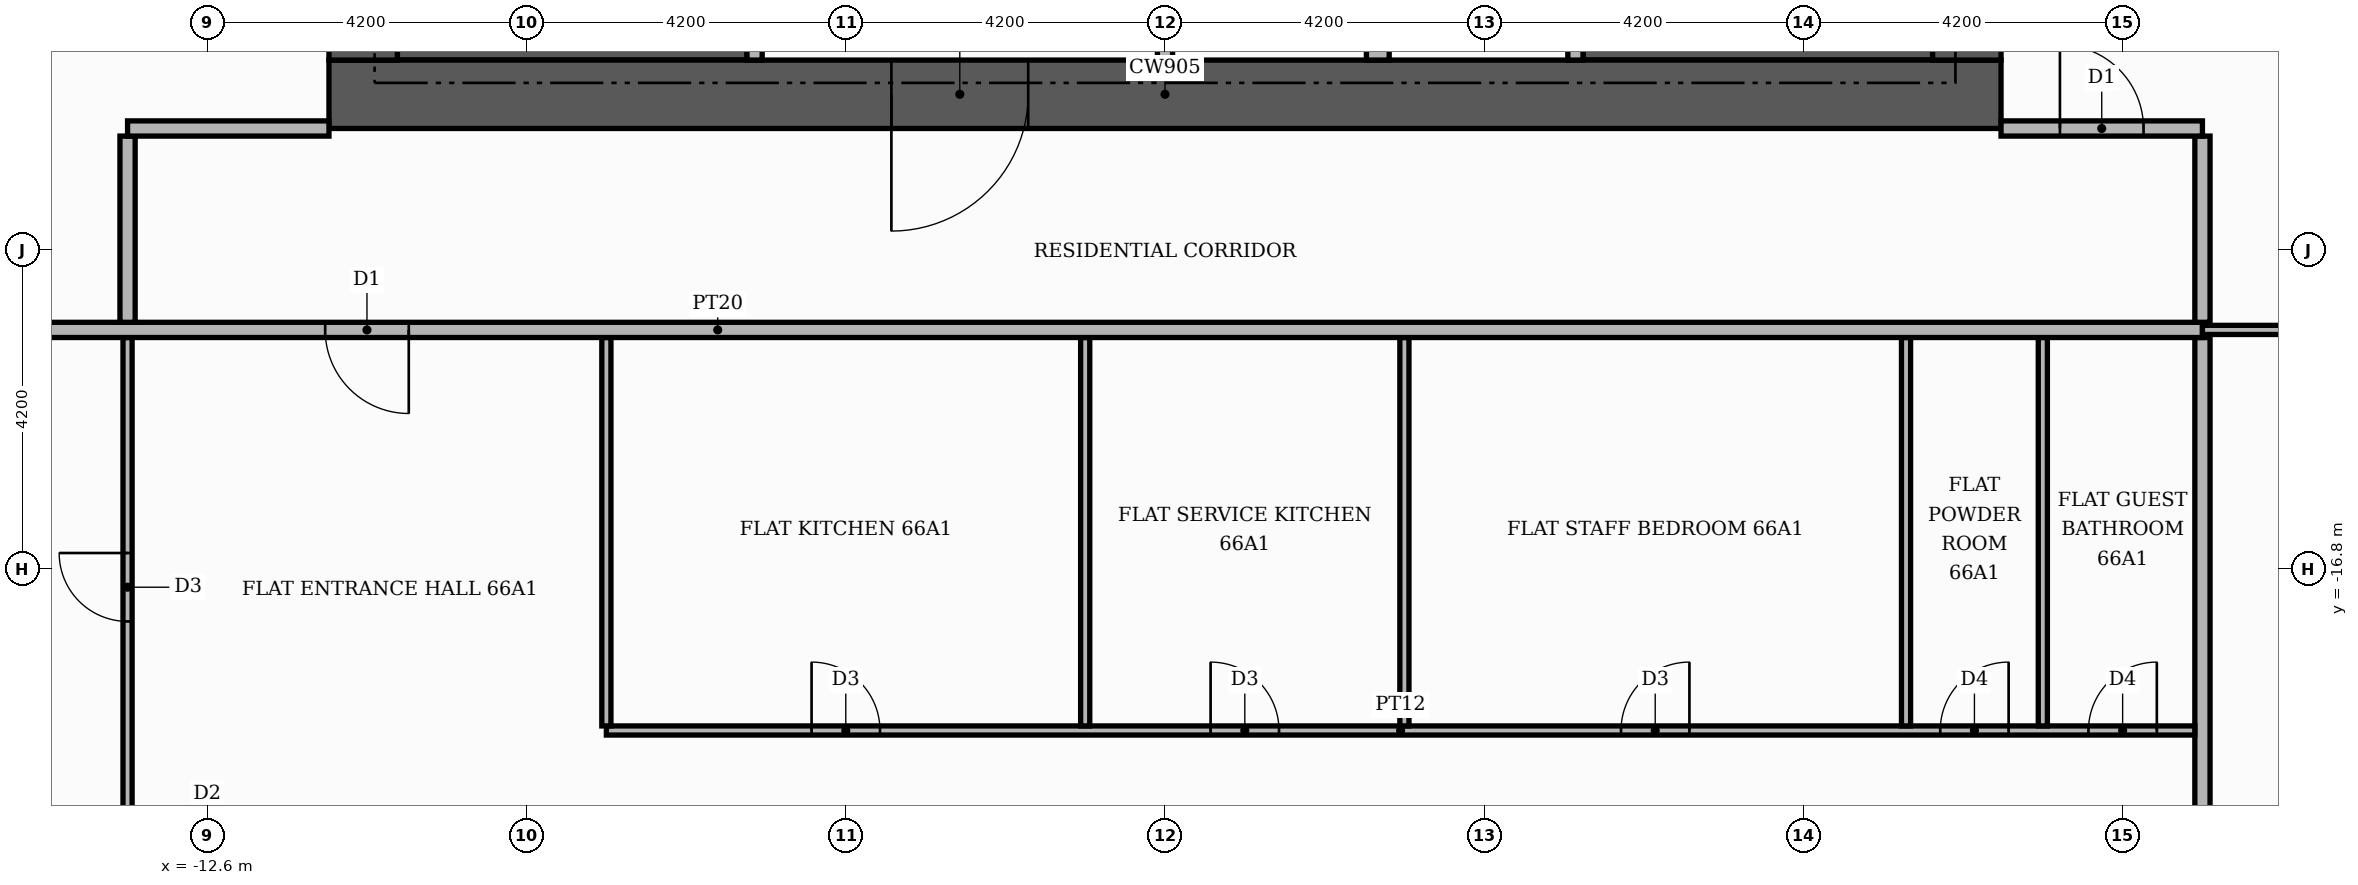
"""IFC4 building model, lengths in metres.
Left out: names, types, materials, properties, quantities, classifications, styles, units other than length and angle.
Written with IfcOpenShell. Run it as: python <this file> out.ifc"""

import sys

from ifc_helpers import new_model, si_unit, direction, frame, frame_2d, origin, place, context, subcontext, project, spatial, rectangle, extrude, element, fill, save


model = new_model("IFC4")
c1 = context("Model", 3, precision=1e-05, world=origin(), true_north=direction((0.0, 1.0)))
c2 = subcontext(c1, "Body", "Model", "MODEL_VIEW")
j1 = project(units=[si_unit("LENGTHUNIT", "METRE"), si_unit("PLANEANGLEUNIT", "RADIAN")], contexts=[c1])
p1 = place(None, origin())
s1 = spatial("IfcSite", under=j1, at=p1, CompositionType="ELEMENT")
p2 = place(p1, origin())
s2 = spatial("IfcBuilding", under=s1, at=p2, CompositionType="ELEMENT")
p3 = place(p2, frame((0.0, 0.0, 275.7)))
s3 = spatial("IfcBuildingStorey", under=s2, at=p3, CompositionType="ELEMENT", Elevation=275.7)
for number, where, z_axis, x_axis in (
    (1, (-10.1, -9.15, 0.0), (0.0, 0.0, 1.0), (1.0, 0.0, 0.0)),
    (2, (5.5, -9.15, 0.0), (0.0, 0.0, 1.0), (1.0, 0.0, 0.0)),
):
    element("IfcWall", number, at=place(p3, frame(where, z_axis=z_axis, x_axis=x_axis)), inside=s3, PredefinedType="SHEAR", context=c2, shape_type="SweptSolid", body=[
        extrude(rectangle(XDim=4.6, YDim=1.9, at=frame_2d((2.3, 0.0))), origin(), (0.0, 0.0, 1.0), 3.48),
    ])
p4 = place(p3, frame((-11.0, -10.55, 0.0), z_axis=(0.0, 0.0, 1.0), x_axis=(1.0, 0.0, 0.0)))
e3 = element("IfcWall", 3, at=p4, inside=s3, PredefinedType="SHEAR", context=c2, shape_type="SweptSolid", body=[
    extrude(rectangle(XDim=22.0, YDim=0.9, at=frame_2d((11.0, 0.0))), origin(), (0.0, 0.0, 1.0), 3.48),
])
p5 = place(p4, frame((7.4, 0.0, 0.0)))
e4 = element("IfcOpeningElement", 4, at=p5, cuts=e3, PredefinedType="OPENING", context=c2, shape_type="SweptSolid", body=[
    extrude(rectangle(XDim=1.8, YDim=2.2, at=frame_2d((0.9, 1.1))), frame((0.0, 0.46, 0.0), z_axis=(0.0, -1.0, 0.0), x_axis=(1.0, 0.0, 0.0)), (0.0, 0.0, 1.0), 0.92),
])
for number, where, z_axis, x_axis in (
    (5, (-10.55, -10.1, 0.0), (0.0, 0.0, 1.0), (0.0, 1.0, 0.0)),
    (6, (10.55, -10.1, 0.0), (0.0, 0.0, 1.0), (0.0, 1.0, 0.0)),
):
    element("IfcWall", number, at=place(p3, frame(where, z_axis=z_axis, x_axis=x_axis)), inside=s3, PredefinedType="SHEAR", context=c2, shape_type="SweptSolid", body=[
        extrude(rectangle(XDim=20.2, YDim=0.9, at=frame_2d((10.1, 0.0))), origin(), (0.0, 0.0, 1.0), 3.48),
    ])
p6 = place(p3, frame((-5.4, -10.1, 0.0), z_axis=(0.0, 0.0, 1.0), x_axis=(0.0, 1.0, 0.0)))
e7 = element("IfcWall", 7, at=p6, inside=s3, PredefinedType="PARTITIONING", context=c2, shape_type="SweptSolid", body=[
    extrude(rectangle(XDim=4.6, YDim=0.2, at=frame_2d((2.3, 0.0))), origin(), (0.0, 0.0, 1.0), 3.48),
])
p7 = place(p6, frame((2.9, 0.0, 0.0)))
e8 = element("IfcOpeningElement", 8, at=p7, cuts=e7, PredefinedType="OPENING", context=c2, shape_type="SweptSolid", body=[
    extrude(rectangle(XDim=1.0, YDim=2.1, at=frame_2d((0.5, 1.05))), frame((0.0, 0.11, 0.0), z_axis=(0.0, -1.0, 0.0), x_axis=(1.0, 0.0, 0.0)), (0.0, 0.0, 1.0), 0.22),
])
p8 = place(p3, frame((0.0, -10.1, 0.0), z_axis=(0.0, 0.0, 1.0), x_axis=(0.0, 1.0, 0.0)))
e9 = element("IfcWall", 9, at=p8, inside=s3, PredefinedType="PARTITIONING", context=c2, shape_type="SweptSolid", body=[
    extrude(rectangle(XDim=2.2, YDim=0.2, at=frame_2d((1.1, 0.0))), origin(), (0.0, 0.0, 1.0), 3.48),
])
p9 = place(p3, frame((2.8, -10.1, 0.0), z_axis=(0.0, 0.0, 1.0), x_axis=(0.0, 1.0, 0.0)))
e10 = element("IfcWall", 10, at=p9, inside=s3, PredefinedType="PARTITIONING", context=c2, shape_type="SweptSolid", body=[
    extrude(rectangle(XDim=2.2, YDim=0.3, at=frame_2d((1.1, 0.0))), origin(), (0.0, 0.0, 1.0), 3.48),
])
p10 = place(p3, frame((5.4, -10.1, 0.0), z_axis=(0.0, 0.0, 1.0), x_axis=(0.0, 1.0, 0.0)))
e11 = element("IfcWall", 11, at=p10, inside=s3, PredefinedType="PARTITIONING", context=c2, shape_type="SweptSolid", body=[
    extrude(rectangle(XDim=4.6, YDim=0.2, at=frame_2d((2.3, 0.0))), origin(), (0.0, 0.0, 1.0), 3.48),
])
p11 = place(p10, frame((2.9, 0.0, 0.0)))
e12 = element("IfcOpeningElement", 12, at=p11, cuts=e11, PredefinedType="OPENING", context=c2, shape_type="SweptSolid", body=[
    extrude(rectangle(XDim=1.0, YDim=2.1, at=frame_2d((0.5, 1.05))), frame((0.0, 0.11, 0.0), z_axis=(0.0, -1.0, 0.0), x_axis=(1.0, 0.0, 0.0)), (0.0, 0.0, 1.0), 0.22),
])
p12 = place(p3, frame((13.65, -25.42, 0.0), z_axis=(0.0, 0.0, 1.0), x_axis=(0.0, 1.0, 0.0)))
e13 = element("IfcWall", 13, at=p12, inside=s3, PredefinedType="PARTITIONING", context=c2, shape_type="SweptSolid", body=[
    extrude(rectangle(XDim=11.67, YDim=0.2, at=frame_2d((5.835, 0.0))), origin(), (0.0, 0.0, 1.0), 3.48),
])
p13 = place(p3, frame((-13.65, -20.36, 0.0), z_axis=(0.0, 0.0, 1.0), x_axis=(0.0, 1.0, 0.0)))
e14 = element("IfcWall", 14, at=p13, inside=s3, PredefinedType="PARTITIONING", context=c2, shape_type="SweptSolid", body=[
    extrude(rectangle(XDim=6.61, YDim=0.12, at=frame_2d((3.305, 0.0))), origin(), (0.0, 0.0, 1.0), 3.48),
])
p14 = place(p13, frame((2.875, 0.0, 0.0)))
e15 = element("IfcOpeningElement", 15, at=p14, cuts=e14, PredefinedType="OPENING", context=c2, shape_type="SweptSolid", body=[
    extrude(rectangle(XDim=0.9, YDim=2.1, at=frame_2d((0.45, 1.05))), frame((0.0, 0.07, 0.0), z_axis=(0.0, -1.0, 0.0), x_axis=(1.0, 0.0, 0.0)), (0.0, 0.0, 1.0), 0.14),
])
p15 = place(p3, frame((-7.35, -18.92, 0.0), z_axis=(0.0, 0.0, 1.0), x_axis=(1.0, 0.0, 0.0)))
e16 = element("IfcWall", 16, at=p15, inside=s3, PredefinedType="PARTITIONING", context=c2, shape_type="SweptSolid", body=[
    extrude(rectangle(XDim=20.9, YDim=0.12, at=frame_2d((10.45, 0.0))), origin(), (0.0, 0.0, 1.0), 3.48),
])
p16 = place(p15, frame((2.7, 0.0, 0.0)))
e17 = element("IfcOpeningElement", 17, at=p16, cuts=e16, PredefinedType="OPENING", context=c2, shape_type="SweptSolid", body=[
    extrude(rectangle(XDim=0.9, YDim=2.1, at=frame_2d((0.45, 1.05))), frame((0.0, 0.07, 0.0), z_axis=(0.0, -1.0, 0.0), x_axis=(1.0, 0.0, 0.0)), (0.0, 0.0, 1.0), 0.14),
])
p17 = place(p15, frame((7.95, 0.0, 0.0)))
e18 = element("IfcOpeningElement", 18, at=p17, cuts=e16, PredefinedType="OPENING", context=c2, shape_type="SweptSolid", body=[
    extrude(rectangle(XDim=0.9, YDim=2.1, at=frame_2d((0.45, 1.05))), frame((0.0, 0.07, 0.0), z_axis=(0.0, -1.0, 0.0), x_axis=(1.0, 0.0, 0.0)), (0.0, 0.0, 1.0), 0.14),
])
p18 = place(p15, frame((13.35, 0.0, 0.0)))
e19 = element("IfcOpeningElement", 19, at=p18, cuts=e16, PredefinedType="OPENING", context=c2, shape_type="SweptSolid", body=[
    extrude(rectangle(XDim=0.9, YDim=2.1, at=frame_2d((0.45, 1.05))), frame((0.0, 0.07, 0.0), z_axis=(0.0, -1.0, 0.0), x_axis=(1.0, 0.0, 0.0)), (0.0, 0.0, 1.0), 0.14),
])
p19 = place(p15, frame((17.55, 0.0, 0.0)))
e20 = element("IfcOpeningElement", 20, at=p19, cuts=e16, PredefinedType="OPENING", context=c2, shape_type="SweptSolid", body=[
    extrude(rectangle(XDim=0.9, YDim=2.1, at=frame_2d((0.45, 1.05))), frame((0.0, 0.07, 0.0), z_axis=(0.0, -1.0, 0.0), x_axis=(1.0, 0.0, 0.0)), (0.0, 0.0, 1.0), 0.14),
])
p20 = place(p15, frame((19.5, 0.0, 0.0)))
e21 = element("IfcOpeningElement", 21, at=p20, cuts=e16, PredefinedType="OPENING", context=c2, shape_type="SweptSolid", body=[
    extrude(rectangle(XDim=0.9, YDim=2.1, at=frame_2d((0.45, 1.05))), frame((0.0, 0.07, 0.0), z_axis=(0.0, -1.0, 0.0), x_axis=(1.0, 0.0, 0.0)), (0.0, 0.0, 1.0), 0.14),
])
for number, where, z_axis, x_axis in (
    (22, (-7.35, -18.86, 0.0), (0.0, 0.0, 1.0), (0.0, 1.0, 0.0)),
    (23, (-1.05, -18.86, 0.0), (0.0, 0.0, 1.0), (0.0, 1.0, 0.0)),
    (24, (3.15, -18.86, 0.0), (0.0, 0.0, 1.0), (0.0, 1.0, 0.0)),
    (25, (9.75, -18.86, 0.0), (0.0, 0.0, 1.0), (0.0, 1.0, 0.0)),
    (26, (11.55, -18.86, 0.0), (0.0, 0.0, 1.0), (0.0, 1.0, 0.0)),
):
    element("IfcWall", number, at=place(p3, frame(where, z_axis=z_axis, x_axis=x_axis)), inside=s3, PredefinedType="PARTITIONING", context=c2, shape_type="SweptSolid", body=[
        extrude(rectangle(XDim=5.11, YDim=0.12, at=frame_2d((2.555, 0.0))), origin(), (0.0, 0.0, 1.0), 3.48),
    ])
p21 = place(p3, frame((-25.42, -13.65, 0.0), z_axis=(0.0, 0.0, 1.0), x_axis=(1.0, 0.0, 0.0)))
e27 = element("IfcWall", 27, at=p21, inside=s3, PredefinedType="PARTITIONING", context=c2, shape_type="SweptSolid", body=[
    extrude(rectangle(XDim=39.07, YDim=0.2, at=frame_2d((19.535, 0.0))), origin(), (0.0, 0.0, 1.0), 3.48),
])
p22 = place(p21, frame((14.37, 0.0, 0.0)))
e28 = element("IfcOpeningElement", 28, at=p22, cuts=e27, PredefinedType="OPENING", context=c2, shape_type="SweptSolid", body=[
    extrude(rectangle(XDim=1.1, YDim=2.4, at=frame_2d((0.55, 1.2))), frame((0.0, 0.11, 0.0), z_axis=(0.0, -1.0, 0.0), x_axis=(1.0, 0.0, 0.0)), (0.0, 0.0, 1.0), 0.22),
])
p23 = place(p3, frame((13.65, -13.65, 0.0), z_axis=(0.0, 0.0, 1.0), x_axis=(1.0, 0.0, 0.0)))
e29 = element("IfcWall", 29, at=p23, inside=s3, PredefinedType="PARTITIONING", context=c2, shape_type="SweptSolid", body=[
    extrude(rectangle(XDim=6.17, YDim=0.12, at=frame_2d((3.085, 0.0))), origin(), (0.0, 0.0, 1.0), 3.48),
])
p24 = place(p23, frame((2.585, 0.0, 0.0)))
e30 = element("IfcOpeningElement", 30, at=p24, cuts=e29, PredefinedType="OPENING", context=c2, shape_type="SweptSolid", body=[
    extrude(rectangle(XDim=1.0, YDim=2.1, at=frame_2d((0.5, 1.05))), frame((0.0, 0.07, 0.0), z_axis=(0.0, -1.0, 0.0), x_axis=(1.0, 0.0, 0.0)), (0.0, 0.0, 1.0), 0.14),
])
for number, where, z_axis, x_axis in (
    (31, (-13.65, -13.55, 0.0), (0.0, 0.0, 1.0), (0.0, 1.0, 0.0)),
    (32, (13.65, -13.55, 0.0), (0.0, 0.0, 1.0), (0.0, 1.0, 0.0)),
):
    element("IfcWall", number, at=place(p3, frame(where, z_axis=z_axis, x_axis=x_axis)), inside=s3, PredefinedType="PARTITIONING", context=c2, shape_type="SweptSolid", body=[
        extrude(rectangle(XDim=2.45, YDim=0.2, at=frame_2d((1.225, 0.0))), origin(), (0.0, 0.0, 1.0), 3.48),
    ])
p25 = place(p3, frame((-13.65, -11.0, 0.0), z_axis=(0.0, 0.0, 1.0), x_axis=(1.0, 0.0, 0.0)))
e33 = element("IfcWall", 33, at=p25, inside=s3, PredefinedType="PARTITIONING", context=c2, shape_type="SweptSolid", body=[
    extrude(rectangle(XDim=2.65, YDim=0.2, at=frame_2d((1.325, 0.0))), origin(), (0.0, 0.0, 1.0), 3.48),
])
p26 = place(p3, frame((11.0, -11.0, 0.0), z_axis=(0.0, 0.0, 1.0), x_axis=(1.0, 0.0, 0.0)))
e34 = element("IfcWall", 34, at=p26, inside=s3, PredefinedType="PARTITIONING", context=c2, shape_type="SweptSolid", body=[
    extrude(rectangle(XDim=2.65, YDim=0.2, at=frame_2d((1.325, 0.0))), origin(), (0.0, 0.0, 1.0), 3.48),
])
p27 = place(p26, frame((0.775, 0.0, 0.0)))
e35 = element("IfcOpeningElement", 35, at=p27, cuts=e34, PredefinedType="OPENING", context=c2, shape_type="SweptSolid", body=[
    extrude(rectangle(XDim=1.1, YDim=2.4, at=frame_2d((0.55, 1.2))), frame((0.0, 0.11, 0.0), z_axis=(0.0, -1.0, 0.0), x_axis=(1.0, 0.0, 0.0)), (0.0, 0.0, 1.0), 0.22),
])
p28 = place(p5, frame((1.8, 0.0, 0.0), z_axis=(0.0, 0.0, 1.0), x_axis=(-1.0, 0.0, 0.0)))
e36 = element("IfcDoor", 36, at=p28, inside=s3, OperationType="DOUBLE_DOOR_SINGLE_SWING", PredefinedType="DOOR", context=c2, shape_type="SweptSolid", body=[
    extrude(rectangle(XDim=1.8, YDim=2.2, at=frame_2d((0.9, 1.1))), frame((0.0, 0.025, 0.0), z_axis=(0.0, -1.0, 0.0), x_axis=(1.0, 0.0, 0.0)), (0.0, 0.0, 1.0), 0.05),
])
fill(e4, e36)
p29 = place(p22, frame((1.1, 0.0, 0.0), z_axis=(0.0, 0.0, 1.0), x_axis=(-1.0, 0.0, 0.0)))
e37 = element("IfcDoor", 37, at=p29, inside=s3, OperationType="SINGLE_SWING_RIGHT", PredefinedType="DOOR", context=c2, shape_type="SweptSolid", body=[
    extrude(rectangle(XDim=1.1, YDim=2.4, at=frame_2d((0.55, 1.2))), frame((0.0, 0.025, 0.0), z_axis=(0.0, -1.0, 0.0), x_axis=(1.0, 0.0, 0.0)), (0.0, 0.0, 1.0), 0.05),
])
fill(e28, e37)
p30 = place(p14, origin())
e38 = element("IfcDoor", 38, at=p30, inside=s3, OperationType="SINGLE_SWING_RIGHT", PredefinedType="DOOR", context=c2, shape_type="SweptSolid", body=[
    extrude(rectangle(XDim=0.9, YDim=2.1, at=frame_2d((0.45, 1.05))), frame((0.0, 0.025, 0.0), z_axis=(0.0, -1.0, 0.0), x_axis=(1.0, 0.0, 0.0)), (0.0, 0.0, 1.0), 0.05),
])
fill(e15, e38)
p31 = place(p16, origin())
e39 = element("IfcDoor", 39, at=p31, inside=s3, OperationType="SINGLE_SWING_LEFT", PredefinedType="DOOR", context=c2, shape_type="SweptSolid", body=[
    extrude(rectangle(XDim=0.9, YDim=2.1, at=frame_2d((0.45, 1.05))), frame((0.0, 0.025, 0.0), z_axis=(0.0, -1.0, 0.0), x_axis=(1.0, 0.0, 0.0)), (0.0, 0.0, 1.0), 0.05),
])
fill(e17, e39)
p32 = place(p17, origin())
e40 = element("IfcDoor", 40, at=p32, inside=s3, OperationType="SINGLE_SWING_LEFT", PredefinedType="DOOR", context=c2, shape_type="SweptSolid", body=[
    extrude(rectangle(XDim=0.9, YDim=2.1, at=frame_2d((0.45, 1.05))), frame((0.0, 0.025, 0.0), z_axis=(0.0, -1.0, 0.0), x_axis=(1.0, 0.0, 0.0)), (0.0, 0.0, 1.0), 0.05),
])
fill(e18, e40)
p33 = place(p18, origin())
e41 = element("IfcDoor", 41, at=p33, inside=s3, OperationType="SINGLE_SWING_RIGHT", PredefinedType="DOOR", context=c2, shape_type="SweptSolid", body=[
    extrude(rectangle(XDim=0.9, YDim=2.1, at=frame_2d((0.45, 1.05))), frame((0.0, 0.025, 0.0), z_axis=(0.0, -1.0, 0.0), x_axis=(1.0, 0.0, 0.0)), (0.0, 0.0, 1.0), 0.05),
])
fill(e19, e41)
p34 = place(p19, origin())
e42 = element("IfcDoor", 42, at=p34, inside=s3, OperationType="SINGLE_SWING_RIGHT", PredefinedType="DOOR", context=c2, shape_type="SweptSolid", body=[
    extrude(rectangle(XDim=0.9, YDim=2.1, at=frame_2d((0.45, 1.05))), frame((0.0, 0.025, 0.0), z_axis=(0.0, -1.0, 0.0), x_axis=(1.0, 0.0, 0.0)), (0.0, 0.0, 1.0), 0.05),
])
fill(e20, e42)
p35 = place(p20, origin())
e43 = element("IfcDoor", 43, at=p35, inside=s3, OperationType="SINGLE_SWING_RIGHT", PredefinedType="DOOR", context=c2, shape_type="SweptSolid", body=[
    extrude(rectangle(XDim=0.9, YDim=2.1, at=frame_2d((0.45, 1.05))), frame((0.0, 0.025, 0.0), z_axis=(0.0, -1.0, 0.0), x_axis=(1.0, 0.0, 0.0)), (0.0, 0.0, 1.0), 0.05),
])
fill(e21, e43)
p36 = place(p27, origin())
e44 = element("IfcDoor", 44, at=p36, inside=s3, OperationType="SINGLE_SWING_LEFT", PredefinedType="DOOR", context=c2, shape_type="SweptSolid", body=[
    extrude(rectangle(XDim=1.1, YDim=2.4, at=frame_2d((0.55, 1.2))), frame((0.0, 0.025, 0.0), z_axis=(0.0, -1.0, 0.0), x_axis=(1.0, 0.0, 0.0)), (0.0, 0.0, 1.0), 0.05),
])
fill(e35, e44)
save(model, sys.argv[1])
